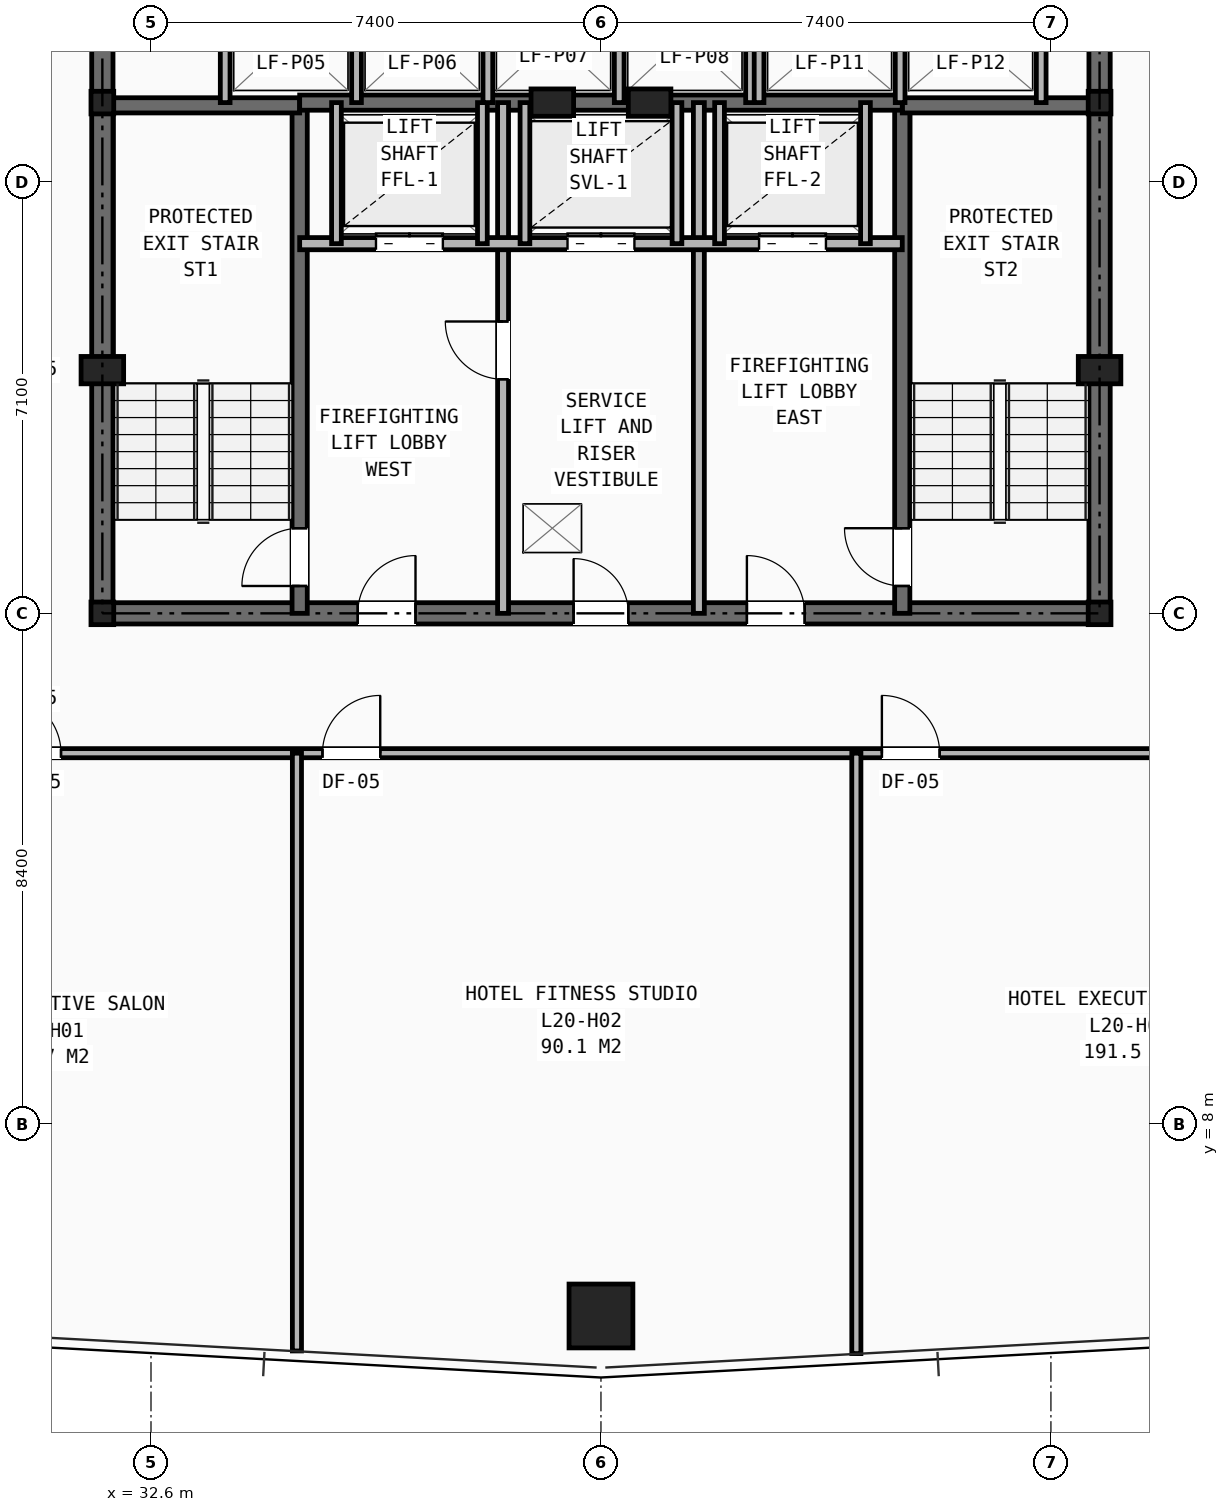
"""IFC4 building model, lengths in metres.
Left out: names, types, materials, properties, quantities, classifications, styles, units other than length and angle.
Written with IfcOpenShell. Run it as: python <this file> out.ifc"""

import sys

from ifc_helpers import new_model, si_unit, direction, frame, frame_2d, origin, origin_2d, place, context, subcontext, project, spatial, rectangle, hollow_rectangle, i_section, extrude, element, fill, save


model = new_model("IFC4")
c1 = context("Model", 3, precision=1e-05, world=origin(), true_north=direction((0.0, 1.0)))
c2 = subcontext(c1, "Body", "Model", "MODEL_VIEW")
j1 = project(units=[si_unit("LENGTHUNIT", "METRE"), si_unit("PLANEANGLEUNIT", "RADIAN")], contexts=[c1])
p1 = place(None, origin())
s1 = spatial("IfcSite", under=j1, at=p1, CompositionType="ELEMENT")
p2 = place(p1, origin())
s2 = spatial("IfcBuilding", under=s1, at=p2, CompositionType="ELEMENT")
p3 = place(p2, frame((0.0, 0.0, 73.4)))
s3 = spatial("IfcBuildingStorey", under=s2, at=p3, CompositionType="ELEMENT", Elevation=73.4)
for number, where, z_axis, x_axis in (
    (1, (31.8, 16.4, 0.0), (0.0, 0.0, 1.0), (1.0, 0.0, 0.0)),
    (2, (48.2, 16.4, 0.0), (0.0, 0.0, 1.0), (1.0, 0.0, 0.0)),
    (3, (31.8, 24.8, 0.0), (0.0, 0.0, 1.0), (1.0, 0.0, 0.0)),
    (4, (48.2, 24.8, 0.0), (0.0, 0.0, 1.0), (1.0, 0.0, 0.0)),
):
    element("IfcColumn", number, at=place(p3, frame(where, z_axis=z_axis, x_axis=x_axis)), inside=s3, PredefinedType="COLUMN", context=c2, shape_type="SweptSolid", body=[
        extrude(i_section(OverallWidth=0.374, OverallDepth=0.372, WebThickness=0.016, FlangeThickness=0.026, at=origin_2d()), origin(), (0.0, 0.0, 1.0), 3.2),
    ])
for number, where, z_axis, x_axis in (
    (5, (31.8, 20.4, 0.0), (0.0, 0.0, 1.0), (1.0, 0.0, 0.0)),
    (6, (48.2, 20.4, 0.0), (0.0, 0.0, 1.0), (1.0, 0.0, 0.0)),
    (7, (39.2, 24.8, 0.0), (0.0, 0.0, 1.0), (1.0, 0.0, 0.0)),
    (8, (40.8, 24.8, 0.0), (0.0, 0.0, 1.0), (1.0, 0.0, 0.0)),
):
    element("IfcColumn", number, at=place(p3, frame(where, z_axis=z_axis, x_axis=x_axis)), inside=s3, PredefinedType="PILASTER", context=c2, shape_type="SweptSolid", body=[
        extrude(rectangle(XDim=0.7, YDim=0.45, at=origin_2d()), origin(), (0.0, 0.0, 1.0), 3.2),
    ])
p4 = place(p3, frame((40.0, 4.844, 0.0), z_axis=(0.0, 0.0, 1.0), x_axis=(1.0, 0.0, 0.0)))
e9 = element("IfcColumn", 9, at=p4, inside=s3, PredefinedType="COLUMN", context=c2, shape_type="SweptSolid", body=[
    extrude(hollow_rectangle(XDim=1.05, YDim=1.05, WallThickness=0.07, at=origin_2d()), origin(), (0.0, 0.0, 1.0), 3.2),
])
p5 = place(p3, frame((31.8, 16.4, 0.0), z_axis=(0.0, 0.0, 1.0), x_axis=(1.0, 0.0, 0.0)))
e10 = element("IfcWall", 10, at=p5, inside=s3, PredefinedType="SHEAR", context=c2, shape_type="SweptSolid", body=[
    extrude(rectangle(XDim=16.4, YDim=0.35, at=frame_2d((8.2, 0.0))), origin(), (0.0, 0.0, 1.0), 2.97),
])
p6 = place(p5, frame((7.75, 0.0, 0.0)))
e11 = element("IfcOpeningElement", 11, at=p6, cuts=e10, PredefinedType="OPENING", context=c2, shape_type="SweptSolid", body=[
    extrude(rectangle(XDim=0.9, YDim=2.1, at=frame_2d((0.45, 1.05))), frame((0.0, 0.185, 0.0), z_axis=(0.0, -1.0, 0.0), x_axis=(1.0, 0.0, 0.0)), (0.0, 0.0, 1.0), 0.37),
])
p7 = place(p5, frame((4.2, 0.0, 0.0)))
e12 = element("IfcOpeningElement", 12, at=p7, cuts=e10, PredefinedType="OPENING", context=c2, shape_type="SweptSolid", body=[
    extrude(rectangle(XDim=0.95, YDim=2.1, at=frame_2d((0.475, 1.05))), frame((0.0, 0.185, 0.0), z_axis=(0.0, -1.0, 0.0), x_axis=(1.0, 0.0, 0.0)), (0.0, 0.0, 1.0), 0.37),
])
p8 = place(p5, frame((10.6, 0.0, 0.0)))
e13 = element("IfcOpeningElement", 13, at=p8, cuts=e10, PredefinedType="OPENING", context=c2, shape_type="SweptSolid", body=[
    extrude(rectangle(XDim=0.95, YDim=2.1, at=frame_2d((0.475, 1.05))), frame((0.0, 0.185, 0.0), z_axis=(0.0, -1.0, 0.0), x_axis=(1.0, 0.0, 0.0)), (0.0, 0.0, 1.0), 0.37),
])
p9 = place(p3, frame((31.8, 16.4, 0.0), z_axis=(0.0, 0.0, 1.0), x_axis=(0.0, 1.0, 0.0)))
e14 = element("IfcWall", 14, at=p9, inside=s3, PredefinedType="SHEAR", context=c2, shape_type="SweptSolid", body=[
    extrude(rectangle(XDim=14.8, YDim=0.35, at=frame_2d((7.4, 0.0))), origin(), (0.0, 0.0, 1.0), 2.97),
])
p10 = place(p9, frame((11.0, 0.0, 0.0)))
e15 = element("IfcOpeningElement", 15, at=p10, cuts=e14, PredefinedType="OPENING", context=c2, shape_type="SweptSolid", body=[
    extrude(rectangle(XDim=1.1, YDim=2.15, at=frame_2d((0.55, 1.075))), frame((0.0, 0.185, 0.0), z_axis=(0.0, -1.0, 0.0), x_axis=(1.0, 0.0, 0.0)), (0.0, 0.0, 1.0), 0.37),
])
p11 = place(p3, frame((48.2, 16.4, 0.0), z_axis=(0.0, 0.0, 1.0), x_axis=(0.0, 1.0, 0.0)))
e16 = element("IfcWall", 16, at=p11, inside=s3, PredefinedType="SHEAR", context=c2, shape_type="SweptSolid", body=[
    extrude(rectangle(XDim=14.8, YDim=0.35, at=frame_2d((7.4, 0.0))), origin(), (0.0, 0.0, 1.0), 2.97),
])
p12 = place(p11, frame((11.0, 0.0, 0.0)))
e17 = element("IfcOpeningElement", 17, at=p12, cuts=e16, PredefinedType="OPENING", context=c2, shape_type="SweptSolid", body=[
    extrude(rectangle(XDim=1.1, YDim=2.15, at=frame_2d((0.55, 1.075))), frame((0.0, 0.185, 0.0), z_axis=(0.0, -1.0, 0.0), x_axis=(1.0, 0.0, 0.0)), (0.0, 0.0, 1.0), 0.37),
])
p13 = place(p3, frame((35.045, 16.4, 0.0), z_axis=(0.0, 0.0, 1.0), x_axis=(0.0, 1.0, 0.0)))
e18 = element("IfcWall", 18, at=p13, inside=s3, PredefinedType="SHEAR", context=c2, shape_type="SweptSolid", body=[
    extrude(rectangle(XDim=8.4, YDim=0.25, at=frame_2d((4.2, 0.0))), origin(), (0.0, 0.0, 1.0), 2.97),
])
p14 = place(p13, frame((0.45, 0.0, 0.0)))
e19 = element("IfcOpeningElement", 19, at=p14, cuts=e18, PredefinedType="OPENING", context=c2, shape_type="SweptSolid", body=[
    extrude(rectangle(XDim=0.95, YDim=2.1, at=frame_2d((0.475, 1.05))), frame((0.0, 0.135, 0.0), z_axis=(0.0, -1.0, 0.0), x_axis=(1.0, 0.0, 0.0)), (0.0, 0.0, 1.0), 0.27),
])
p15 = place(p3, frame((31.8, 24.755, 0.0), z_axis=(0.0, 0.0, 1.0), x_axis=(1.0, 0.0, 0.0)))
e20 = element("IfcWall", 20, at=p15, inside=s3, PredefinedType="SHEAR", context=c2, shape_type="SweptSolid", body=[
    extrude(rectangle(XDim=3.245, YDim=0.25, at=frame_2d((1.623, 0.0))), origin(), (0.0, 0.0, 1.0), 2.97),
])
p16 = place(p3, frame((44.955, 16.4, 0.0), z_axis=(0.0, 0.0, 1.0), x_axis=(0.0, 1.0, 0.0)))
e21 = element("IfcWall", 21, at=p16, inside=s3, PredefinedType="SHEAR", context=c2, shape_type="SweptSolid", body=[
    extrude(rectangle(XDim=8.4, YDim=0.25, at=frame_2d((4.2, 0.0))), origin(), (0.0, 0.0, 1.0), 2.97),
])
p17 = place(p16, frame((0.45, 0.0, 0.0)))
e22 = element("IfcOpeningElement", 22, at=p17, cuts=e21, PredefinedType="OPENING", context=c2, shape_type="SweptSolid", body=[
    extrude(rectangle(XDim=0.95, YDim=2.1, at=frame_2d((0.475, 1.05))), frame((0.0, 0.135, 0.0), z_axis=(0.0, -1.0, 0.0), x_axis=(1.0, 0.0, 0.0)), (0.0, 0.0, 1.0), 0.27),
])
p18 = place(p3, frame((44.955, 24.755, 0.0), z_axis=(0.0, 0.0, 1.0), x_axis=(1.0, 0.0, 0.0)))
e23 = element("IfcWall", 23, at=p18, inside=s3, PredefinedType="SHEAR", context=c2, shape_type="SweptSolid", body=[
    extrude(rectangle(XDim=3.245, YDim=0.25, at=frame_2d((1.623, 0.0))), origin(), (0.0, 0.0, 1.0), 2.97),
])
p19 = place(p3, frame((35.045, 24.8, 0.0), z_axis=(0.0, 0.0, 1.0), x_axis=(1.0, 0.0, 0.0)))
e24 = element("IfcWall", 24, at=p19, inside=s3, PredefinedType="SHEAR", context=c2, shape_type="SweptSolid", body=[
    extrude(rectangle(XDim=9.91, YDim=0.25, at=frame_2d((4.955, 0.0))), origin(), (0.0, 0.0, 1.0), 2.97),
])
p20 = place(p3, frame((38.39, 16.4, 0.0), z_axis=(0.0, 0.0, 1.0), x_axis=(0.0, 1.0, 0.0)))
e25 = element("IfcWall", 25, at=p20, inside=s3, PredefinedType="PARTITIONING", context=c2, shape_type="SweptSolid", body=[
    extrude(rectangle(XDim=8.4, YDim=0.18, at=frame_2d((4.2, 0.0))), origin(), (0.0, 0.0, 1.0), 2.698),
])
p21 = place(p20, frame((3.85, 0.0, 0.0)))
e26 = element("IfcOpeningElement", 26, at=p21, cuts=e25, PredefinedType="OPENING", context=c2, shape_type="SweptSolid", body=[
    extrude(rectangle(XDim=0.95, YDim=2.1, at=frame_2d((0.475, 1.05))), frame((0.0, 0.1, 0.0), z_axis=(0.0, -1.0, 0.0), x_axis=(1.0, 0.0, 0.0)), (0.0, 0.0, 1.0), 0.2),
])
p22 = place(p3, frame((41.61, 16.4, 0.0), z_axis=(0.0, 0.0, 1.0), x_axis=(0.0, 1.0, 0.0)))
e27 = element("IfcWall", 27, at=p22, inside=s3, PredefinedType="PARTITIONING", context=c2, shape_type="SweptSolid", body=[
    extrude(rectangle(XDim=8.4, YDim=0.18, at=frame_2d((4.2, 0.0))), origin(), (0.0, 0.0, 1.0), 2.698),
])
p23 = place(p3, frame((35.045, 22.48, 0.0), z_axis=(0.0, 0.0, 1.0), x_axis=(1.0, 0.0, 0.0)))
e28 = element("IfcWall", 28, at=p23, inside=s3, PredefinedType="SOLIDWALL", context=c2, shape_type="SweptSolid", body=[
    extrude(rectangle(XDim=9.91, YDim=0.2, at=frame_2d((4.955, 0.0))), origin(), (0.0, 0.0, 1.0), 2.97),
])
p24 = place(p23, frame((1.255, 0.0, 0.0)))
e29 = element("IfcOpeningElement", 29, at=p24, cuts=e28, PredefinedType="OPENING", context=c2, shape_type="SweptSolid", body=[
    extrude(rectangle(XDim=1.1, YDim=2.15, at=frame_2d((0.55, 1.075))), frame((0.0, 0.11, 0.0), z_axis=(0.0, -1.0, 0.0), x_axis=(1.0, 0.0, 0.0)), (0.0, 0.0, 1.0), 0.22),
])
p25 = place(p23, frame((7.555, 0.0, 0.0)))
e30 = element("IfcOpeningElement", 30, at=p25, cuts=e28, PredefinedType="OPENING", context=c2, shape_type="SweptSolid", body=[
    extrude(rectangle(XDim=1.1, YDim=2.15, at=frame_2d((0.55, 1.075))), frame((0.0, 0.11, 0.0), z_axis=(0.0, -1.0, 0.0), x_axis=(1.0, 0.0, 0.0)), (0.0, 0.0, 1.0), 0.22),
])
p26 = place(p23, frame((4.405, 0.0, 0.0)))
e31 = element("IfcOpeningElement", 31, at=p26, cuts=e28, PredefinedType="OPENING", context=c2, shape_type="SweptSolid", body=[
    extrude(rectangle(XDim=1.1, YDim=2.15, at=frame_2d((0.55, 1.075))), frame((0.0, 0.11, 0.0), z_axis=(0.0, -1.0, 0.0), x_axis=(1.0, 0.0, 0.0)), (0.0, 0.0, 1.0), 0.22),
])
for number, where, z_axis, x_axis in (
    (32, (35.65, 22.48, 0.0), (0.0, 0.0, 1.0), (0.0, 1.0, 0.0)),
    (33, (38.05, 22.48, 0.0), (0.0, 0.0, 1.0), (0.0, 1.0, 0.0)),
    (34, (41.95, 22.48, 0.0), (0.0, 0.0, 1.0), (0.0, 1.0, 0.0)),
    (35, (44.35, 22.48, 0.0), (0.0, 0.0, 1.0), (0.0, 1.0, 0.0)),
    (36, (38.75, 22.48, 0.0), (0.0, 0.0, 1.0), (0.0, 1.0, 0.0)),
    (37, (41.25, 22.48, 0.0), (0.0, 0.0, 1.0), (0.0, 1.0, 0.0)),
):
    element("IfcWall", number, at=place(p3, frame(where, z_axis=z_axis, x_axis=x_axis)), inside=s3, PredefinedType="SOLIDWALL", context=c2, shape_type="SweptSolid", body=[
        extrude(rectangle(XDim=2.32, YDim=0.16, at=frame_2d((1.16, 0.0))), origin(), (0.0, 0.0, 1.0), 2.97),
    ])
for number, where, z_axis, x_axis in (
    (38, (33.82, 24.8, 0.0), (0.0, 0.0, 1.0), (0.0, 1.0, 0.0)),
    (39, (35.98, 24.8, 0.0), (0.0, 0.0, 1.0), (0.0, 1.0, 0.0)),
    (40, (38.14, 24.8, 0.0), (0.0, 0.0, 1.0), (0.0, 1.0, 0.0)),
    (41, (40.3, 24.8, 0.0), (0.0, 0.0, 1.0), (0.0, 1.0, 0.0)),
    (42, (42.46, 24.8, 0.0), (0.0, 0.0, 1.0), (0.0, 1.0, 0.0)),
    (43, (42.6, 24.8, 0.0), (0.0, 0.0, 1.0), (0.0, 1.0, 0.0)),
    (44, (44.92, 24.8, 0.0), (0.0, 0.0, 1.0), (0.0, 1.0, 0.0)),
    (45, (47.24, 24.8, 0.0), (0.0, 0.0, 1.0), (0.0, 1.0, 0.0)),
):
    element("IfcWall", number, at=place(p3, frame(where, z_axis=z_axis, x_axis=x_axis)), inside=s3, PredefinedType="SOLIDWALL", context=c2, shape_type="SweptSolid", body=[
        extrude(rectangle(XDim=2.08, YDim=0.16, at=frame_2d((1.04, 0.0))), origin(), (0.0, 0.0, 1.0), 2.97),
    ])
p27 = place(p3, frame((29.6, 14.1, 0.0), z_axis=(0.0, 0.0, 1.0), x_axis=(1.0, 0.0, 0.0)))
e46 = element("IfcWall", 46, at=p27, inside=s3, PredefinedType="PARTITIONING", context=c2, shape_type="SweptSolid", body=[
    extrude(rectangle(XDim=20.8, YDim=0.15, at=frame_2d((10.4, 0.0))), origin(), (0.0, 0.0, 1.0), 2.421),
])
p28 = place(p27, frame((0.57, 0.0, 0.0)))
e47 = element("IfcOpeningElement", 47, at=p28, cuts=e46, PredefinedType="OPENING", context=c2, shape_type="SweptSolid", body=[
    extrude(rectangle(XDim=0.95, YDim=2.1, at=frame_2d((0.475, 1.05))), frame((0.0, 0.085, 0.0), z_axis=(0.0, -1.0, 0.0), x_axis=(1.0, 0.0, 0.0)), (0.0, 0.0, 1.0), 0.17),
])
p29 = place(p27, frame((5.82, 0.0, 0.0)))
e48 = element("IfcOpeningElement", 48, at=p29, cuts=e46, PredefinedType="OPENING", context=c2, shape_type="SweptSolid", body=[
    extrude(rectangle(XDim=0.95, YDim=2.1, at=frame_2d((0.475, 1.05))), frame((0.0, 0.085, 0.0), z_axis=(0.0, -1.0, 0.0), x_axis=(1.0, 0.0, 0.0)), (0.0, 0.0, 1.0), 0.17),
])
p30 = place(p27, frame((15.02, 0.0, 0.0)))
e49 = element("IfcOpeningElement", 49, at=p30, cuts=e46, PredefinedType="OPENING", context=c2, shape_type="SweptSolid", body=[
    extrude(rectangle(XDim=0.95, YDim=2.1, at=frame_2d((0.475, 1.05))), frame((0.0, 0.085, 0.0), z_axis=(0.0, -1.0, 0.0), x_axis=(1.0, 0.0, 0.0)), (0.0, 0.0, 1.0), 0.17),
])
p31 = place(p3, frame((35.0, 4.269, 0.0), z_axis=(0.0, 0.0, 1.0), x_axis=(0.0, 1.0, 0.0)))
e50 = element("IfcWall", 50, at=p31, inside=s3, PredefinedType="PARTITIONING", context=c2, shape_type="SweptSolid", body=[
    extrude(rectangle(XDim=9.831, YDim=0.15, at=frame_2d((4.916, 0.0))), origin(), (0.0, 0.0, 1.0), 2.258),
])
p32 = place(p3, frame((44.2, 4.225, 0.0), z_axis=(0.0, 0.0, 1.0), x_axis=(0.0, 1.0, 0.0)))
e51 = element("IfcWall", 51, at=p32, inside=s3, PredefinedType="PARTITIONING", context=c2, shape_type="SweptSolid", body=[
    extrude(rectangle(XDim=9.875, YDim=0.15, at=frame_2d((4.938, 0.0))), origin(), (0.0, 0.0, 1.0), 2.258),
])
p33 = place(p6, origin())
e52 = element("IfcDoor", 52, at=p33, inside=s3, OperationType="SINGLE_SWING_LEFT", PredefinedType="DOOR", context=c2, shape_type="SweptSolid", body=[
    extrude(rectangle(XDim=0.9, YDim=2.1, at=frame_2d((0.45, 1.05))), frame((0.0, 0.025, 0.0), z_axis=(0.0, -1.0, 0.0), x_axis=(1.0, 0.0, 0.0)), (0.0, 0.0, 1.0), 0.05),
])
fill(e11, e52)
p34 = place(p21, origin())
e53 = element("IfcDoor", 53, at=p34, inside=s3, OperationType="SINGLE_SWING_RIGHT", PredefinedType="DOOR", context=c2, shape_type="SweptSolid", body=[
    extrude(rectangle(XDim=0.95, YDim=2.1, at=frame_2d((0.475, 1.05))), frame((0.0, 0.025, 0.0), z_axis=(0.0, -1.0, 0.0), x_axis=(1.0, 0.0, 0.0)), (0.0, 0.0, 1.0), 0.05),
])
fill(e26, e53)
p35 = place(p14, origin())
e54 = element("IfcDoor", 54, at=p35, inside=s3, OperationType="SINGLE_SWING_LEFT", PredefinedType="DOOR", context=c2, shape_type="SweptSolid", body=[
    extrude(rectangle(XDim=0.95, YDim=2.1, at=frame_2d((0.475, 1.05))), frame((0.0, 0.025, 0.0), z_axis=(0.0, -1.0, 0.0), x_axis=(1.0, 0.0, 0.0)), (0.0, 0.0, 1.0), 0.05),
])
fill(e19, e54)
p36 = place(p17, origin())
e55 = element("IfcDoor", 55, at=p36, inside=s3, OperationType="SINGLE_SWING_RIGHT", PredefinedType="DOOR", context=c2, shape_type="SweptSolid", body=[
    extrude(rectangle(XDim=0.95, YDim=2.1, at=frame_2d((0.475, 1.05))), frame((0.0, 0.025, 0.0), z_axis=(0.0, -1.0, 0.0), x_axis=(1.0, 0.0, 0.0)), (0.0, 0.0, 1.0), 0.05),
])
fill(e22, e55)
p37 = place(p7, origin())
e56 = element("IfcDoor", 56, at=p37, inside=s3, OperationType="SINGLE_SWING_RIGHT", PredefinedType="DOOR", context=c2, shape_type="SweptSolid", body=[
    extrude(rectangle(XDim=0.95, YDim=2.1, at=frame_2d((0.475, 1.05))), frame((0.0, 0.025, 0.0), z_axis=(0.0, -1.0, 0.0), x_axis=(1.0, 0.0, 0.0)), (0.0, 0.0, 1.0), 0.05),
])
fill(e12, e56)
p38 = place(p8, origin())
e57 = element("IfcDoor", 57, at=p38, inside=s3, OperationType="SINGLE_SWING_LEFT", PredefinedType="DOOR", context=c2, shape_type="SweptSolid", body=[
    extrude(rectangle(XDim=0.95, YDim=2.1, at=frame_2d((0.475, 1.05))), frame((0.0, 0.025, 0.0), z_axis=(0.0, -1.0, 0.0), x_axis=(1.0, 0.0, 0.0)), (0.0, 0.0, 1.0), 0.05),
])
fill(e13, e57)
p39 = place(p24, origin())
e58 = element("IfcDoor", 58, at=p39, inside=s3, OperationType="DOUBLE_DOOR_SLIDING", PredefinedType="DOOR", context=c2, shape_type="SweptSolid", body=[
    extrude(rectangle(XDim=1.1, YDim=2.15, at=frame_2d((0.55, 1.075))), frame((0.0, 0.025, 0.0), z_axis=(0.0, -1.0, 0.0), x_axis=(1.0, 0.0, 0.0)), (0.0, 0.0, 1.0), 0.05),
])
fill(e29, e58)
p40 = place(p25, origin())
e59 = element("IfcDoor", 59, at=p40, inside=s3, OperationType="DOUBLE_DOOR_SLIDING", PredefinedType="DOOR", context=c2, shape_type="SweptSolid", body=[
    extrude(rectangle(XDim=1.1, YDim=2.15, at=frame_2d((0.55, 1.075))), frame((0.0, 0.025, 0.0), z_axis=(0.0, -1.0, 0.0), x_axis=(1.0, 0.0, 0.0)), (0.0, 0.0, 1.0), 0.05),
])
fill(e30, e59)
p41 = place(p26, origin())
e60 = element("IfcDoor", 60, at=p41, inside=s3, OperationType="DOUBLE_DOOR_SLIDING", PredefinedType="DOOR", context=c2, shape_type="SweptSolid", body=[
    extrude(rectangle(XDim=1.1, YDim=2.15, at=frame_2d((0.55, 1.075))), frame((0.0, 0.025, 0.0), z_axis=(0.0, -1.0, 0.0), x_axis=(1.0, 0.0, 0.0)), (0.0, 0.0, 1.0), 0.05),
])
fill(e31, e60)
p42 = place(p28, origin())
e61 = element("IfcDoor", 61, at=p42, inside=s3, OperationType="SINGLE_SWING_LEFT", PredefinedType="DOOR", context=c2, shape_type="SweptSolid", body=[
    extrude(rectangle(XDim=0.95, YDim=2.1, at=frame_2d((0.475, 1.05))), frame((0.0, 0.025, 0.0), z_axis=(0.0, -1.0, 0.0), x_axis=(1.0, 0.0, 0.0)), (0.0, 0.0, 1.0), 0.05),
])
fill(e47, e61)
p43 = place(p29, origin())
e62 = element("IfcDoor", 62, at=p43, inside=s3, OperationType="SINGLE_SWING_RIGHT", PredefinedType="DOOR", context=c2, shape_type="SweptSolid", body=[
    extrude(rectangle(XDim=0.95, YDim=2.1, at=frame_2d((0.475, 1.05))), frame((0.0, 0.025, 0.0), z_axis=(0.0, -1.0, 0.0), x_axis=(1.0, 0.0, 0.0)), (0.0, 0.0, 1.0), 0.05),
])
fill(e48, e62)
p44 = place(p30, origin())
e63 = element("IfcDoor", 63, at=p44, inside=s3, OperationType="SINGLE_SWING_LEFT", PredefinedType="DOOR", context=c2, shape_type="SweptSolid", body=[
    extrude(rectangle(XDim=0.95, YDim=2.1, at=frame_2d((0.475, 1.05))), frame((0.0, 0.025, 0.0), z_axis=(0.0, -1.0, 0.0), x_axis=(1.0, 0.0, 0.0)), (0.0, 0.0, 1.0), 0.05),
])
fill(e49, e63)
save(model, sys.argv[1])
